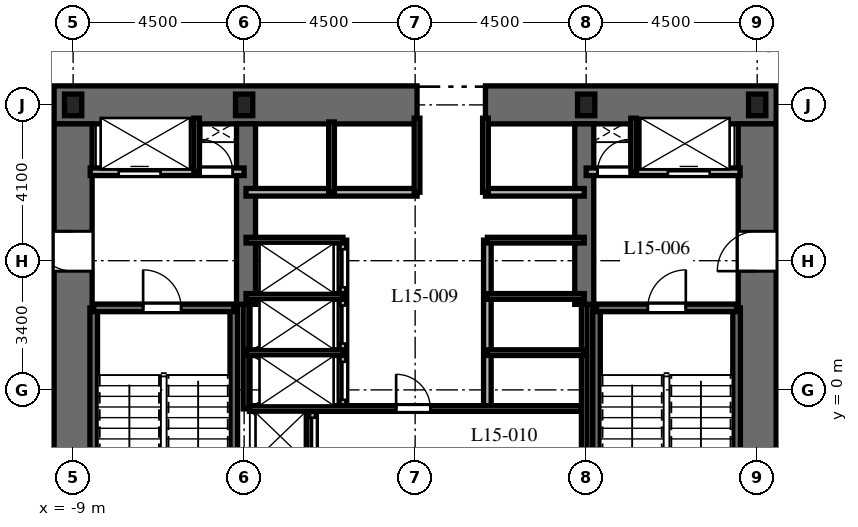
"""IFC4 building model, lengths in metres.
Left out: names, types, materials, properties, quantities, classifications, styles, units other than length and angle.
Written with IfcOpenShell. Run it as: python <this file> out.ifc"""

import sys

from ifc_helpers import new_model, si_unit, direction, frame, frame_2d, origin, origin_2d, place, context, subcontext, project, spatial, rectangle, i_section, extrude, element, fill, save


model = new_model("IFC4")
c1 = context("Model", 3, precision=1e-05, world=origin(), true_north=direction((0.0, 1.0)))
c2 = subcontext(c1, "Body", "Model", "MODEL_VIEW")
j1 = project(units=[si_unit("LENGTHUNIT", "METRE"), si_unit("PLANEANGLEUNIT", "RADIAN")], contexts=[c1])
p1 = place(None, origin())
s1 = spatial("IfcSite", under=j1, at=p1, CompositionType="ELEMENT")
p2 = place(p1, origin())
s2 = spatial("IfcBuilding", under=s1, at=p2, CompositionType="ELEMENT")
p3 = place(p2, frame((0.0, 0.0, 67.5)))
s3 = spatial("IfcBuildingStorey", under=s2, at=p3, CompositionType="ELEMENT", Elevation=67.5)
p4 = place(p3, frame((-9.5, 7.5, 0.0), z_axis=(0.0, 0.0, 1.0), x_axis=(1.0, 0.0, 0.0)))
e1 = element("IfcWall", 1, at=p4, inside=s3, PredefinedType="SHEAR", context=c2, shape_type="SweptSolid", body=[
    extrude(rectangle(XDim=9.55, YDim=1.0, at=frame_2d((4.775, 0.0))), origin(), (0.0, 0.0, 1.0), 3.7),
])
p5 = place(p3, frame((1.85, 7.5, 0.0), z_axis=(0.0, 0.0, 1.0), x_axis=(1.0, 0.0, 0.0)))
e2 = element("IfcWall", 2, at=p5, inside=s3, PredefinedType="SHEAR", context=c2, shape_type="SweptSolid", body=[
    extrude(rectangle(XDim=7.65, YDim=1.0, at=frame_2d((3.825, 0.0))), origin(), (0.0, 0.0, 1.0), 3.7),
])
p6 = place(p3, frame((-9.0, -7.0, 0.0), z_axis=(0.0, 0.0, 1.0), x_axis=(0.0, 1.0, 0.0)))
e3 = element("IfcWall", 3, at=p6, inside=s3, PredefinedType="SHEAR", context=c2, shape_type="SweptSolid", body=[
    extrude(rectangle(XDim=14.0, YDim=1.0, at=frame_2d((7.0, 0.0))), origin(), (0.0, 0.0, 1.0), 3.7),
])
p7 = place(p6, frame((10.125, 0.0, 0.0)))
e4 = element("IfcOpeningElement", 4, at=p7, cuts=e3, PredefinedType="OPENING", context=c2, shape_type="SweptSolid", body=[
    extrude(rectangle(XDim=1.05, YDim=2.15, at=frame_2d((0.525, 1.075))), frame((0.0, 0.51, 0.0), z_axis=(0.0, -1.0, 0.0), x_axis=(1.0, 0.0, 0.0)), (0.0, 0.0, 1.0), 1.02),
])
p8 = place(p3, frame((9.0, -7.0, 0.0), z_axis=(0.0, 0.0, 1.0), x_axis=(0.0, 1.0, 0.0)))
e5 = element("IfcWall", 5, at=p8, inside=s3, PredefinedType="SHEAR", context=c2, shape_type="SweptSolid", body=[
    extrude(rectangle(XDim=14.0, YDim=1.0, at=frame_2d((7.0, 0.0))), origin(), (0.0, 0.0, 1.0), 3.7),
])
p9 = place(p8, frame((10.125, 0.0, 0.0)))
e6 = element("IfcOpeningElement", 6, at=p9, cuts=e5, PredefinedType="OPENING", context=c2, shape_type="SweptSolid", body=[
    extrude(rectangle(XDim=1.05, YDim=2.15, at=frame_2d((0.525, 1.075))), frame((0.0, 0.51, 0.0), z_axis=(0.0, -1.0, 0.0), x_axis=(1.0, 0.0, 0.0)), (0.0, 0.0, 1.0), 1.02),
])
for number, where, z_axis, x_axis in (
    (7, (-4.45, 2.25, 0.0), (0.0, 0.0, 1.0), (0.0, 1.0, 0.0)),
    (8, (4.45, 2.25, 0.0), (0.0, 0.0, 1.0), (0.0, 1.0, 0.0)),
):
    element("IfcWall", number, at=place(p3, frame(where, z_axis=z_axis, x_axis=x_axis)), inside=s3, PredefinedType="SHEAR", context=c2, shape_type="SweptSolid", body=[
        extrude(rectangle(XDim=4.75, YDim=0.5, at=frame_2d((2.375, 0.0))), origin(), (0.0, 0.0, 1.0), 3.7),
    ])
for number, where, z_axis, x_axis in (
    (9, (-8.458, -6.985, 0.0), (0.0, 0.0, 1.0), (0.0, 1.0, 0.0)),
    (10, (-4.772, -6.985, 0.0), (0.0, 0.0, 1.0), (0.0, 1.0, 0.0)),
):
    element("IfcWall", number, at=place(p3, frame(where, z_axis=z_axis, x_axis=x_axis)), inside=s3, PredefinedType="SHEAR", context=c2, shape_type="SweptSolid", body=[
        extrude(rectangle(XDim=9.143, YDim=0.2, at=frame_2d((4.572, 0.0))), origin(), (0.0, 0.0, 1.0), 3.7),
    ])
p10 = place(p3, frame((-8.458, 2.158, 0.0), z_axis=(0.0, 0.0, 1.0), x_axis=(1.0, 0.0, 0.0)))
e11 = element("IfcWall", 11, at=p10, inside=s3, PredefinedType="SHEAR", context=c2, shape_type="SweptSolid", body=[
    extrude(rectangle(XDim=3.686, YDim=0.2, at=frame_2d((1.843, 0.0))), origin(), (0.0, 0.0, 1.0), 3.7),
])
p11 = place(p10, frame((1.3, 0.0, 0.0)))
e12 = element("IfcOpeningElement", 12, at=p11, cuts=e11, PredefinedType="OPENING", context=c2, shape_type="SweptSolid", body=[
    extrude(rectangle(XDim=1.0, YDim=2.15, at=frame_2d((0.5, 1.075))), frame((0.0, 0.11, 0.0), z_axis=(0.0, -1.0, 0.0), x_axis=(1.0, 0.0, 0.0)), (0.0, 0.0, 1.0), 0.22),
])
for number, where, z_axis, x_axis in (
    (13, (4.772, -6.985, 0.0), (0.0, 0.0, 1.0), (0.0, 1.0, 0.0)),
    (14, (8.458, -6.985, 0.0), (0.0, 0.0, 1.0), (0.0, 1.0, 0.0)),
):
    element("IfcWall", number, at=place(p3, frame(where, z_axis=z_axis, x_axis=x_axis)), inside=s3, PredefinedType="SHEAR", context=c2, shape_type="SweptSolid", body=[
        extrude(rectangle(XDim=9.143, YDim=0.2, at=frame_2d((4.572, 0.0))), origin(), (0.0, 0.0, 1.0), 3.7),
    ])
p12 = place(p3, frame((4.772, 2.158, 0.0), z_axis=(0.0, 0.0, 1.0), x_axis=(1.0, 0.0, 0.0)))
e15 = element("IfcWall", 15, at=p12, inside=s3, PredefinedType="SHEAR", context=c2, shape_type="SweptSolid", body=[
    extrude(rectangle(XDim=3.686, YDim=0.2, at=frame_2d((1.843, 0.0))), origin(), (0.0, 0.0, 1.0), 3.7),
])
p13 = place(p12, frame((1.35, 0.0, 0.0)))
e16 = element("IfcOpeningElement", 16, at=p13, cuts=e15, PredefinedType="OPENING", context=c2, shape_type="SweptSolid", body=[
    extrude(rectangle(XDim=1.0, YDim=2.15, at=frame_2d((0.5, 1.075))), frame((0.0, 0.11, 0.0), z_axis=(0.0, -1.0, 0.0), x_axis=(1.0, 0.0, 0.0)), (0.0, 0.0, 1.0), 0.22),
])
for number, where, z_axis, x_axis in (
    (17, (9.0, 7.5, 0.0), (0.0, 0.0, 1.0), (1.0, 0.0, 0.0)),
    (18, (4.5, 7.5, 0.0), (0.0, 0.0, 1.0), (1.0, 0.0, 0.0)),
    (19, (-4.5, 7.5, 0.0), (0.0, 0.0, 1.0), (1.0, 0.0, 0.0)),
    (20, (-9.0, 7.5, 0.0), (0.0, 0.0, 1.0), (1.0, 0.0, 0.0)),
):
    element("IfcColumn", number, at=place(p3, frame(where, z_axis=z_axis, x_axis=x_axis)), inside=s3, PredefinedType="COLUMN", context=c2, shape_type="SweptSolid", body=[
        extrude(i_section(OverallWidth=0.454, OverallDepth=0.569, WebThickness=0.078, FlangeThickness=0.125, at=origin_2d()), origin(), (0.0, 0.0, 1.0), 3.7),
    ])
p14 = place(p3, frame((-8.55, 5.74, 0.0), z_axis=(0.0, 0.0, 1.0), x_axis=(1.0, 0.0, 0.0)))
e21 = element("IfcWall", 21, at=p14, inside=s3, PredefinedType="PARTITIONING", context=c2, shape_type="SweptSolid", body=[
    extrude(rectangle(XDim=4.05, YDim=0.2, at=frame_2d((2.025, 0.0))), origin(), (0.0, 0.0, 1.0), 3.4),
])
p15 = place(p14, frame((0.75, 0.0, 0.0)))
e22 = element("IfcOpeningElement", 22, at=p15, cuts=e21, PredefinedType="OPENING", context=c2, shape_type="SweptSolid", body=[
    extrude(rectangle(XDim=1.1, YDim=2.2, at=frame_2d((0.55, 1.1))), frame((0.0, 0.11, 0.0), z_axis=(0.0, -1.0, 0.0), x_axis=(1.0, 0.0, 0.0)), (0.0, 0.0, 1.0), 0.22),
])
p16 = place(p14, frame((2.9, 0.0, 0.0)))
e23 = element("IfcOpeningElement", 23, at=p16, cuts=e21, PredefinedType="OPENING", context=c2, shape_type="SweptSolid", body=[
    extrude(rectangle(XDim=0.85, YDim=2.03, at=frame_2d((0.425, 1.015))), frame((0.0, 0.11, 0.0), z_axis=(0.0, -1.0, 0.0), x_axis=(1.0, 0.0, 0.0)), (0.0, 0.0, 1.0), 0.22),
])
p17 = place(p3, frame((-5.75, 5.74, 0.0), z_axis=(0.0, 0.0, 1.0), x_axis=(0.0, 1.0, 0.0)))
e24 = element("IfcWall", 24, at=p17, inside=s3, PredefinedType="PARTITIONING", context=c2, shape_type="SweptSolid", body=[
    extrude(rectangle(XDim=1.41, YDim=0.15, at=frame_2d((0.705, 0.0))), origin(), (0.0, 0.0, 1.0), 3.4),
])
p18 = place(p3, frame((4.5, 5.74, 0.0), z_axis=(0.0, 0.0, 1.0), x_axis=(1.0, 0.0, 0.0)))
e25 = element("IfcWall", 25, at=p18, inside=s3, PredefinedType="PARTITIONING", context=c2, shape_type="SweptSolid", body=[
    extrude(rectangle(XDim=4.05, YDim=0.2, at=frame_2d((2.025, 0.0))), origin(), (0.0, 0.0, 1.0), 3.4),
])
p19 = place(p18, frame((0.3, 0.0, 0.0)))
e26 = element("IfcOpeningElement", 26, at=p19, cuts=e25, PredefinedType="OPENING", context=c2, shape_type="SweptSolid", body=[
    extrude(rectangle(XDim=0.85, YDim=2.03, at=frame_2d((0.425, 1.015))), frame((0.0, 0.11, 0.0), z_axis=(0.0, -1.0, 0.0), x_axis=(1.0, 0.0, 0.0)), (0.0, 0.0, 1.0), 0.22),
])
p20 = place(p18, frame((2.15, 0.0, 0.0)))
e27 = element("IfcOpeningElement", 27, at=p20, cuts=e25, PredefinedType="OPENING", context=c2, shape_type="SweptSolid", body=[
    extrude(rectangle(XDim=1.1, YDim=2.2, at=frame_2d((0.55, 1.1))), frame((0.0, 0.11, 0.0), z_axis=(0.0, -1.0, 0.0), x_axis=(1.0, 0.0, 0.0)), (0.0, 0.0, 1.0), 0.22),
])
p21 = place(p3, frame((5.75, 5.74, 0.0), z_axis=(0.0, 0.0, 1.0), x_axis=(0.0, 1.0, 0.0)))
e28 = element("IfcWall", 28, at=p21, inside=s3, PredefinedType="PARTITIONING", context=c2, shape_type="SweptSolid", body=[
    extrude(rectangle(XDim=1.41, YDim=0.15, at=frame_2d((0.705, 0.0))), origin(), (0.0, 0.0, 1.0), 3.4),
])
p22 = place(p3, frame((-2.7, -1.972, 0.0), z_axis=(0.0, 0.0, 1.0), x_axis=(0.0, 1.0, 0.0)))
e29 = element("IfcWall", 29, at=p22, inside=s3, PredefinedType="PARTITIONING", context=c2, shape_type="SweptSolid", body=[
    extrude(rectangle(XDim=1.472, YDim=0.2, at=frame_2d((0.736, 0.0))), origin(), (0.0, 0.0, 1.0), 3.4),
])
p23 = place(p22, frame((0.24, 0.0, 0.0)))
e30 = element("IfcOpeningElement", 30, at=p23, cuts=e29, PredefinedType="OPENING", context=c2, shape_type="SweptSolid", body=[
    extrude(rectangle(XDim=1.0, YDim=2.2, at=frame_2d((0.5, 1.1))), frame((0.0, 0.11, 0.0), z_axis=(0.0, -1.0, 0.0), x_axis=(1.0, 0.0, 0.0)), (0.0, 0.0, 1.0), 0.22),
])
p24 = place(p3, frame((-4.45, 5.2, 0.0), z_axis=(0.0, 0.0, 1.0), x_axis=(1.0, 0.0, 0.0)))
e31 = element("IfcWall", 31, at=p24, inside=s3, PredefinedType="PARTITIONING", context=c2, shape_type="SweptSolid", body=[
    extrude(rectangle(XDim=4.5, YDim=0.2, at=frame_2d((2.25, 0.0))), origin(), (0.0, 0.0, 1.0), 3.4),
])
p25 = place(p3, frame((1.85, 5.2, 0.0), z_axis=(0.0, 0.0, 1.0), x_axis=(1.0, 0.0, 0.0)))
e32 = element("IfcWall", 32, at=p25, inside=s3, PredefinedType="PARTITIONING", context=c2, shape_type="SweptSolid", body=[
    extrude(rectangle(XDim=2.6, YDim=0.2, at=frame_2d((1.3, 0.0))), origin(), (0.0, 0.0, 1.0), 3.4),
])
p26 = place(p3, frame((-2.2, 5.2, 0.0), z_axis=(0.0, 0.0, 1.0), x_axis=(0.0, 1.0, 0.0)))
e33 = element("IfcWall", 33, at=p26, inside=s3, PredefinedType="PARTITIONING", context=c2, shape_type="SweptSolid", body=[
    extrude(rectangle(XDim=1.85, YDim=0.15, at=frame_2d((0.925, 0.0))), origin(), (0.0, 0.0, 1.0), 3.4),
])
for number, where, z_axis, x_axis in (
    (34, (0.05, 5.2, 0.0), (0.0, 0.0, 1.0), (0.0, 1.0, 0.0)),
    (35, (1.85, 5.2, 0.0), (0.0, 0.0, 1.0), (0.0, 1.0, 0.0)),
):
    element("IfcWall", number, at=place(p3, frame(where, z_axis=z_axis, x_axis=x_axis)), inside=s3, PredefinedType="PARTITIONING", context=c2, shape_type="SweptSolid", body=[
        extrude(rectangle(XDim=1.95, YDim=0.15, at=frame_2d((0.975, 0.0))), origin(), (0.0, 0.0, 1.0), 3.4),
    ])
p27 = place(p3, frame((-4.45, -0.5, 0.0), z_axis=(0.0, 0.0, 1.0), x_axis=(0.0, 1.0, 0.0)))
e36 = element("IfcWall", 36, at=p27, inside=s3, PredefinedType="PARTITIONING", context=c2, shape_type="SweptSolid", body=[
    extrude(rectangle(XDim=2.75, YDim=0.15, at=frame_2d((1.375, 0.0))), origin(), (0.0, 0.0, 1.0), 3.4),
])
p28 = place(p3, frame((4.45, -1.972, 0.0), z_axis=(0.0, 0.0, 1.0), x_axis=(0.0, 1.0, 0.0)))
e37 = element("IfcWall", 37, at=p28, inside=s3, PredefinedType="PARTITIONING", context=c2, shape_type="SweptSolid", body=[
    extrude(rectangle(XDim=4.222, YDim=0.15, at=frame_2d((2.111, 0.0))), origin(), (0.0, 0.0, 1.0), 3.4),
])
p29 = place(p3, frame((-1.9, -0.5, 0.0), z_axis=(0.0, 0.0, 1.0), x_axis=(0.0, 1.0, 0.0)))
e38 = element("IfcWall", 38, at=p29, inside=s3, PredefinedType="PARTITIONING", context=c2, shape_type="SweptSolid", body=[
    extrude(rectangle(XDim=4.44, YDim=0.2, at=frame_2d((2.22, 0.0))), origin(), (0.0, 0.0, 1.0), 3.4),
])
p30 = place(p29, frame((0.24, 0.0, 0.0)))
e39 = element("IfcOpeningElement", 39, at=p30, cuts=e38, PredefinedType="OPENING", context=c2, shape_type="SweptSolid", body=[
    extrude(rectangle(XDim=1.0, YDim=2.2, at=frame_2d((0.5, 1.1))), frame((0.0, 0.11, 0.0), z_axis=(0.0, -1.0, 0.0), x_axis=(1.0, 0.0, 0.0)), (0.0, 0.0, 1.0), 0.22),
])
p31 = place(p29, frame((1.72, 0.0, 0.0)))
e40 = element("IfcOpeningElement", 40, at=p31, cuts=e38, PredefinedType="OPENING", context=c2, shape_type="SweptSolid", body=[
    extrude(rectangle(XDim=1.0, YDim=2.2, at=frame_2d((0.5, 1.1))), frame((0.0, 0.11, 0.0), z_axis=(0.0, -1.0, 0.0), x_axis=(1.0, 0.0, 0.0)), (0.0, 0.0, 1.0), 0.22),
])
p32 = place(p29, frame((3.2, 0.0, 0.0)))
e41 = element("IfcOpeningElement", 41, at=p32, cuts=e38, PredefinedType="OPENING", context=c2, shape_type="SweptSolid", body=[
    extrude(rectangle(XDim=1.0, YDim=2.2, at=frame_2d((0.5, 1.1))), frame((0.0, 0.11, 0.0), z_axis=(0.0, -1.0, 0.0), x_axis=(1.0, 0.0, 0.0)), (0.0, 0.0, 1.0), 0.22),
])
for number, where, z_axis, x_axis in (
    (42, (-4.45, 3.94, 0.0), (0.0, 0.0, 1.0), (1.0, 0.0, 0.0)),
    (43, (-4.45, 0.98, 0.0), (0.0, 0.0, 1.0), (1.0, 0.0, 0.0)),
    (44, (-4.45, 2.46, 0.0), (0.0, 0.0, 1.0), (1.0, 0.0, 0.0)),
):
    element("IfcWall", number, at=place(p3, frame(where, z_axis=z_axis, x_axis=x_axis)), inside=s3, PredefinedType="PARTITIONING", context=c2, shape_type="SweptSolid", body=[
        extrude(rectangle(XDim=2.55, YDim=0.15, at=frame_2d((1.275, 0.0))), origin(), (0.0, 0.0, 1.0), 3.4),
    ])
p33 = place(p3, frame((1.9, -0.5, 0.0), z_axis=(0.0, 0.0, 1.0), x_axis=(0.0, 1.0, 0.0)))
e45 = element("IfcWall", 45, at=p33, inside=s3, PredefinedType="PARTITIONING", context=c2, shape_type="SweptSolid", body=[
    extrude(rectangle(XDim=4.44, YDim=0.2, at=frame_2d((2.22, 0.0))), origin(), (0.0, 0.0, 1.0), 3.4),
])
for number, where, z_axis, x_axis in (
    (46, (1.9, 3.94, 0.0), (0.0, 0.0, 1.0), (1.0, 0.0, 0.0)),
    (47, (1.9, 0.98, 0.0), (0.0, 0.0, 1.0), (1.0, 0.0, 0.0)),
    (48, (1.9, 2.46, 0.0), (0.0, 0.0, 1.0), (1.0, 0.0, 0.0)),
):
    element("IfcWall", number, at=place(p3, frame(where, z_axis=z_axis, x_axis=x_axis)), inside=s3, PredefinedType="PARTITIONING", context=c2, shape_type="SweptSolid", body=[
        extrude(rectangle(XDim=2.55, YDim=0.15, at=frame_2d((1.275, 0.0))), origin(), (0.0, 0.0, 1.0), 3.4),
    ])
p34 = place(p3, frame((-4.36, -0.49, 0.0), z_axis=(0.0, 0.0, 1.0), x_axis=(1.0, 0.0, 0.0)))
e49 = element("IfcWall", 49, at=p34, inside=s3, PredefinedType="PARTITIONING", context=c2, shape_type="SweptSolid", body=[
    extrude(rectangle(XDim=8.72, YDim=0.15, at=frame_2d((4.36, 0.0))), origin(), (0.0, 0.0, 1.0), 3.4),
])
p35 = place(p34, frame((3.86, 0.0, 0.0)))
e50 = element("IfcOpeningElement", 50, at=p35, cuts=e49, PredefinedType="OPENING", context=c2, shape_type="SweptSolid", body=[
    extrude(rectangle(XDim=0.9, YDim=2.03, at=frame_2d((0.45, 1.015))), frame((0.0, 0.085, 0.0), z_axis=(0.0, -1.0, 0.0), x_axis=(1.0, 0.0, 0.0)), (0.0, 0.0, 1.0), 0.17),
])
p36 = place(p11, origin())
e51 = element("IfcDoor", 51, at=p36, inside=s3, OperationType="SINGLE_SWING_LEFT", PredefinedType="DOOR", context=c2, shape_type="SweptSolid", body=[
    extrude(rectangle(XDim=1.0, YDim=2.15, at=frame_2d((0.5, 1.075))), frame((0.0, 0.025, 0.0), z_axis=(0.0, -1.0, 0.0), x_axis=(1.0, 0.0, 0.0)), (0.0, 0.0, 1.0), 0.05),
])
fill(e12, e51)
p37 = place(p13, origin())
e52 = element("IfcDoor", 52, at=p37, inside=s3, OperationType="SINGLE_SWING_RIGHT", PredefinedType="DOOR", context=c2, shape_type="SweptSolid", body=[
    extrude(rectangle(XDim=1.0, YDim=2.15, at=frame_2d((0.5, 1.075))), frame((0.0, 0.025, 0.0), z_axis=(0.0, -1.0, 0.0), x_axis=(1.0, 0.0, 0.0)), (0.0, 0.0, 1.0), 0.05),
])
fill(e16, e52)
p38 = place(p7, origin())
e53 = element("IfcDoor", 53, at=p38, inside=s3, OperationType="SINGLE_SWING_RIGHT", PredefinedType="DOOR", context=c2, shape_type="SweptSolid", body=[
    extrude(rectangle(XDim=1.05, YDim=2.15, at=frame_2d((0.525, 1.075))), frame((0.0, 0.025, 0.0), z_axis=(0.0, -1.0, 0.0), x_axis=(1.0, 0.0, 0.0)), (0.0, 0.0, 1.0), 0.05),
])
fill(e4, e53)
p39 = place(p9, origin())
e54 = element("IfcDoor", 54, at=p39, inside=s3, OperationType="SINGLE_SWING_LEFT", PredefinedType="DOOR", context=c2, shape_type="SweptSolid", body=[
    extrude(rectangle(XDim=1.05, YDim=2.15, at=frame_2d((0.525, 1.075))), frame((0.0, 0.025, 0.0), z_axis=(0.0, -1.0, 0.0), x_axis=(1.0, 0.0, 0.0)), (0.0, 0.0, 1.0), 0.05),
])
fill(e6, e54)
p40 = place(p15, origin())
e55 = element("IfcDoor", 55, at=p40, inside=s3, OperationType="SLIDING_TO_LEFT", PredefinedType="DOOR", context=c2, shape_type="SweptSolid", body=[
    extrude(rectangle(XDim=1.1, YDim=2.2, at=frame_2d((0.55, 1.1))), frame((0.0, 0.025, 0.0), z_axis=(0.0, -1.0, 0.0), x_axis=(1.0, 0.0, 0.0)), (0.0, 0.0, 1.0), 0.05),
])
fill(e22, e55)
p41 = place(p16, origin())
e56 = element("IfcDoor", 56, at=p41, inside=s3, OperationType="SINGLE_SWING_LEFT", PredefinedType="DOOR", context=c2, shape_type="SweptSolid", body=[
    extrude(rectangle(XDim=0.85, YDim=2.03, at=frame_2d((0.425, 1.015))), frame((0.0, 0.025, 0.0), z_axis=(0.0, -1.0, 0.0), x_axis=(1.0, 0.0, 0.0)), (0.0, 0.0, 1.0), 0.05),
])
fill(e23, e56)
p42 = place(p19, origin())
e57 = element("IfcDoor", 57, at=p42, inside=s3, OperationType="SINGLE_SWING_RIGHT", PredefinedType="DOOR", context=c2, shape_type="SweptSolid", body=[
    extrude(rectangle(XDim=0.85, YDim=2.03, at=frame_2d((0.425, 1.015))), frame((0.0, 0.025, 0.0), z_axis=(0.0, -1.0, 0.0), x_axis=(1.0, 0.0, 0.0)), (0.0, 0.0, 1.0), 0.05),
])
fill(e26, e57)
p43 = place(p20, origin())
e58 = element("IfcDoor", 58, at=p43, inside=s3, OperationType="SLIDING_TO_RIGHT", PredefinedType="DOOR", context=c2, shape_type="SweptSolid", body=[
    extrude(rectangle(XDim=1.1, YDim=2.2, at=frame_2d((0.55, 1.1))), frame((0.0, 0.025, 0.0), z_axis=(0.0, -1.0, 0.0), x_axis=(1.0, 0.0, 0.0)), (0.0, 0.0, 1.0), 0.05),
])
fill(e27, e58)
p44 = place(p23, origin())
e59 = element("IfcDoor", 59, at=p44, inside=s3, OperationType="SLIDING_TO_LEFT", PredefinedType="DOOR", context=c2, shape_type="SweptSolid", body=[
    extrude(rectangle(XDim=1.0, YDim=2.2, at=frame_2d((0.5, 1.1))), frame((0.0, 0.025, 0.0), z_axis=(0.0, -1.0, 0.0), x_axis=(1.0, 0.0, 0.0)), (0.0, 0.0, 1.0), 0.05),
])
fill(e30, e59)
p45 = place(p30, origin())
e60 = element("IfcDoor", 60, at=p45, inside=s3, OperationType="SLIDING_TO_LEFT", PredefinedType="DOOR", context=c2, shape_type="SweptSolid", body=[
    extrude(rectangle(XDim=1.0, YDim=2.2, at=frame_2d((0.5, 1.1))), frame((0.0, 0.025, 0.0), z_axis=(0.0, -1.0, 0.0), x_axis=(1.0, 0.0, 0.0)), (0.0, 0.0, 1.0), 0.05),
])
fill(e39, e60)
p46 = place(p31, origin())
e61 = element("IfcDoor", 61, at=p46, inside=s3, OperationType="SLIDING_TO_LEFT", PredefinedType="DOOR", context=c2, shape_type="SweptSolid", body=[
    extrude(rectangle(XDim=1.0, YDim=2.2, at=frame_2d((0.5, 1.1))), frame((0.0, 0.025, 0.0), z_axis=(0.0, -1.0, 0.0), x_axis=(1.0, 0.0, 0.0)), (0.0, 0.0, 1.0), 0.05),
])
fill(e40, e61)
p47 = place(p32, origin())
e62 = element("IfcDoor", 62, at=p47, inside=s3, OperationType="SLIDING_TO_LEFT", PredefinedType="DOOR", context=c2, shape_type="SweptSolid", body=[
    extrude(rectangle(XDim=1.0, YDim=2.2, at=frame_2d((0.5, 1.1))), frame((0.0, 0.025, 0.0), z_axis=(0.0, -1.0, 0.0), x_axis=(1.0, 0.0, 0.0)), (0.0, 0.0, 1.0), 0.05),
])
fill(e41, e62)
p48 = place(p35, origin())
e63 = element("IfcDoor", 63, at=p48, inside=s3, OperationType="SINGLE_SWING_LEFT", PredefinedType="DOOR", context=c2, shape_type="SweptSolid", body=[
    extrude(rectangle(XDim=0.9, YDim=2.03, at=frame_2d((0.45, 1.015))), frame((0.0, 0.025, 0.0), z_axis=(0.0, -1.0, 0.0), x_axis=(1.0, 0.0, 0.0)), (0.0, 0.0, 1.0), 0.05),
])
fill(e50, e63)
save(model, sys.argv[1])
